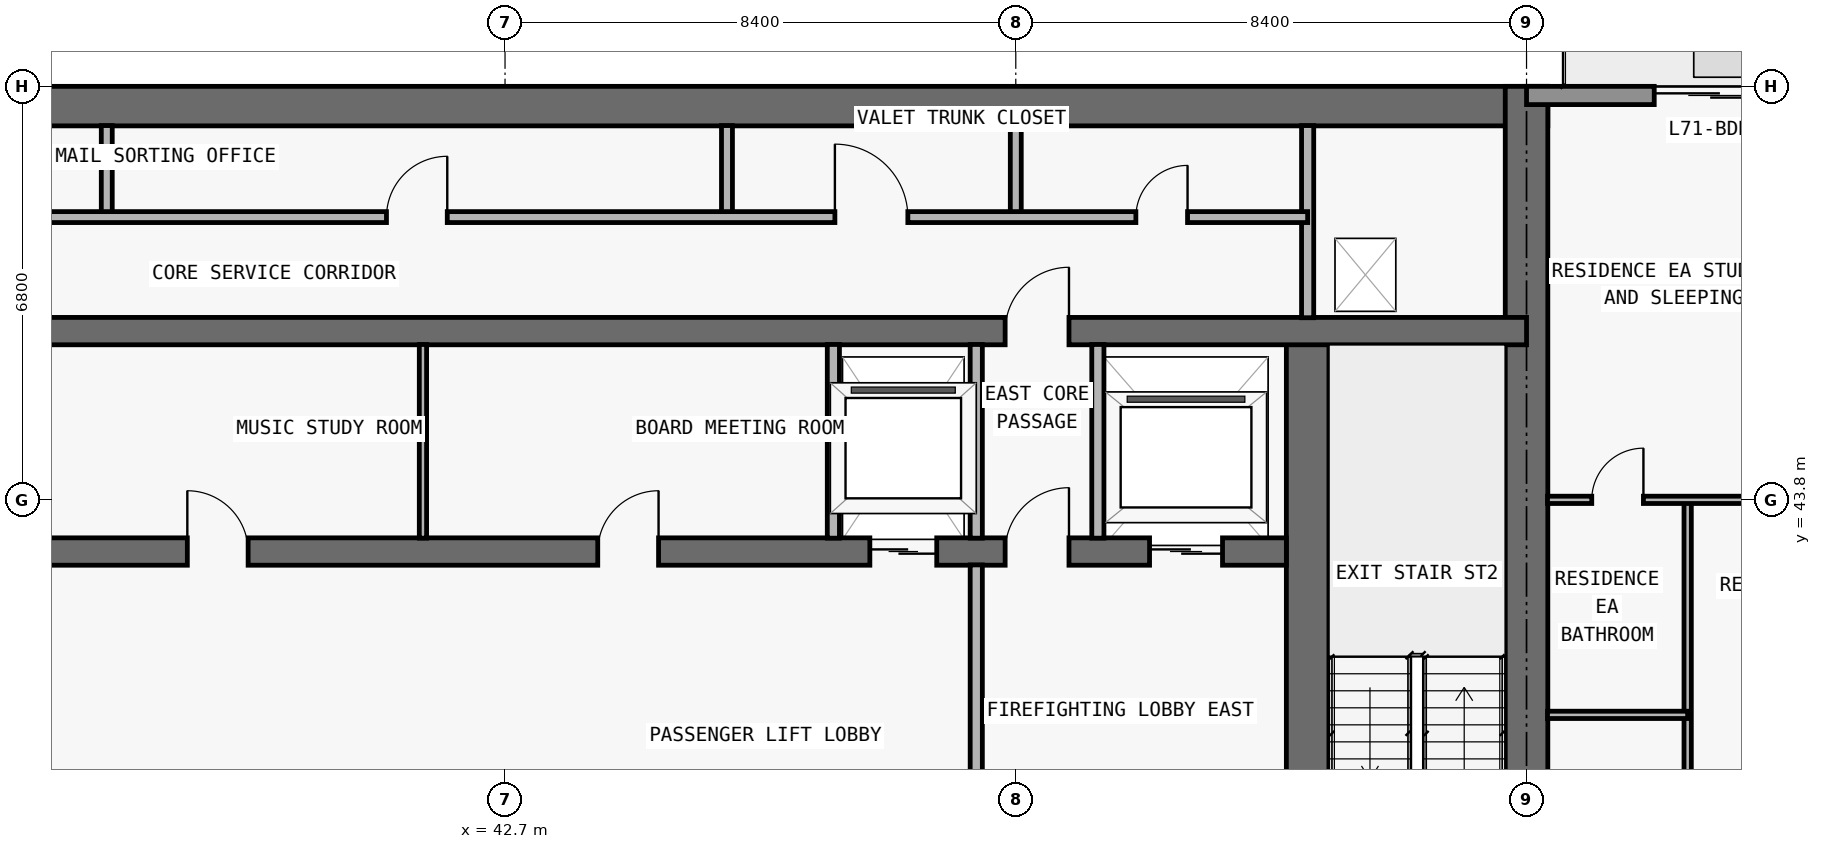
"""IFC4 building model, lengths in metres.
Left out: names, types, materials, properties, quantities, classifications, styles, units other than length and angle.
Written with IfcOpenShell. Run it as: python <this file> out.ifc"""

import sys

from ifc_helpers import new_model, si_unit, direction, frame, frame_2d, origin, place, context, subcontext, project, spatial, rectangle, extrude, element, fill, save


model = new_model("IFC4")
c1 = context("Model", 3, precision=1e-05, world=origin(), true_north=direction((0.0, 1.0)))
c2 = subcontext(c1, "Body", "Model", "MODEL_VIEW")
j1 = project(units=[si_unit("LENGTHUNIT", "METRE"), si_unit("PLANEANGLEUNIT", "RADIAN")], contexts=[c1])
p1 = place(None, origin())
s1 = spatial("IfcSite", under=j1, at=p1, CompositionType="ELEMENT")
p2 = place(p1, origin())
s2 = spatial("IfcBuilding", under=s1, at=p2, CompositionType="ELEMENT")
p3 = place(p2, frame((0.0, 0.0, 252.9)))
s3 = spatial("IfcBuildingStorey", under=s2, at=p3, CompositionType="ELEMENT", Elevation=252.9)
p4 = place(p3, frame((17.95, 50.275, 0.0), z_axis=(0.0, 0.0, 1.0), x_axis=(1.0, 0.0, 0.0)))
e1 = element("IfcWall", 1, at=p4, inside=s3, PredefinedType="SHEAR", context=c2, shape_type="SweptSolid", body=[
    extrude(rectangle(XDim=41.9, YDim=0.65, at=frame_2d((20.95, 0.0))), origin(), (0.0, 0.0, 1.0), 3.05),
])
p5 = place(p3, frame((59.5, 36.65, 0.0), z_axis=(0.0, 0.0, 1.0), x_axis=(0.0, 1.0, 0.0)))
e2 = element("IfcWall", 2, at=p5, inside=s3, PredefinedType="SHEAR", context=c2, shape_type="SweptSolid", body=[
    extrude(rectangle(XDim=13.95, YDim=0.7, at=frame_2d((6.975, 0.0))), origin(), (0.0, 0.0, 1.0), 3.05),
])
p6 = place(p3, frame((55.9, 37.0, 0.0), z_axis=(0.0, 0.0, 1.0), x_axis=(0.0, 1.0, 0.0)))
e3 = element("IfcWall", 3, at=p6, inside=s3, PredefinedType="SHEAR", context=c2, shape_type="SweptSolid", body=[
    extrude(rectangle(XDim=9.575, YDim=0.7, at=frame_2d((4.788, 0.0))), origin(), (0.0, 0.0, 1.0), 3.05),
])
p7 = place(p6, frame((0.55, 0.0, 0.0)))
e4 = element("IfcOpeningElement", 4, at=p7, cuts=e3, PredefinedType="OPENING", context=c2, shape_type="SweptSolid", body=[
    extrude(rectangle(XDim=1.1, YDim=2.15, at=frame_2d((0.55, 1.075))), frame((0.0, 0.36, 0.0), z_axis=(0.0, -1.0, 0.0), x_axis=(1.0, 0.0, 0.0)), (0.0, 0.0, 1.0), 0.72),
])
p8 = place(p3, frame((22.25, 42.95, 0.0), z_axis=(0.0, 0.0, 1.0), x_axis=(1.0, 0.0, 0.0)))
e5 = element("IfcWall", 5, at=p8, inside=s3, PredefinedType="SHEAR", context=c2, shape_type="SweptSolid", body=[
    extrude(rectangle(XDim=33.3, YDim=0.45, at=frame_2d((16.65, 0.0))), origin(), (0.0, 0.0, 1.0), 3.05),
])
p9 = place(p8, frame((1.05, 0.0, 0.0)))
e6 = element("IfcOpeningElement", 6, at=p9, cuts=e5, PredefinedType="OPENING", context=c2, shape_type="SweptSolid", body=[
    extrude(rectangle(XDim=1.2, YDim=2.2, at=frame_2d((0.6, 1.1))), frame((0.0, 0.235, 0.0), z_axis=(0.0, -1.0, 0.0), x_axis=(1.0, 0.0, 0.0)), (0.0, 0.0, 1.0), 0.47),
])
p10 = place(p8, frame((31.05, 0.0, 0.0)))
e7 = element("IfcOpeningElement", 7, at=p10, cuts=e5, PredefinedType="OPENING", context=c2, shape_type="SweptSolid", body=[
    extrude(rectangle(XDim=1.2, YDim=2.2, at=frame_2d((0.6, 1.1))), frame((0.0, 0.235, 0.0), z_axis=(0.0, -1.0, 0.0), x_axis=(1.0, 0.0, 0.0)), (0.0, 0.0, 1.0), 0.47),
])
p11 = place(p8, frame((26.45, 0.0, 0.0)))
e8 = element("IfcOpeningElement", 8, at=p11, cuts=e5, PredefinedType="OPENING", context=c2, shape_type="SweptSolid", body=[
    extrude(rectangle(XDim=1.1, YDim=2.2, at=frame_2d((0.55, 1.1))), frame((0.0, 0.235, 0.0), z_axis=(0.0, -1.0, 0.0), x_axis=(1.0, 0.0, 0.0)), (0.0, 0.0, 1.0), 0.47),
])
p12 = place(p8, frame((5.95, 0.0, 0.0)))
e9 = element("IfcOpeningElement", 9, at=p12, cuts=e5, PredefinedType="OPENING", context=c2, shape_type="SweptSolid", body=[
    extrude(rectangle(XDim=1.1, YDim=2.2, at=frame_2d((0.55, 1.1))), frame((0.0, 0.235, 0.0), z_axis=(0.0, -1.0, 0.0), x_axis=(1.0, 0.0, 0.0)), (0.0, 0.0, 1.0), 0.47),
])
p13 = place(p8, frame((3.625, 0.0, 0.0)))
e10 = element("IfcOpeningElement", 10, at=p13, cuts=e5, PredefinedType="OPENING", context=c2, shape_type="SweptSolid", body=[
    extrude(rectangle(XDim=1.05, YDim=2.15, at=frame_2d((0.525, 1.075))), frame((0.0, 0.235, 0.0), z_axis=(0.0, -1.0, 0.0), x_axis=(1.0, 0.0, 0.0)), (0.0, 0.0, 1.0), 0.47),
])
p14 = place(p8, frame((28.675, 0.0, 0.0)))
e11 = element("IfcOpeningElement", 11, at=p14, cuts=e5, PredefinedType="OPENING", context=c2, shape_type="SweptSolid", body=[
    extrude(rectangle(XDim=1.05, YDim=2.15, at=frame_2d((0.525, 1.075))), frame((0.0, 0.235, 0.0), z_axis=(0.0, -1.0, 0.0), x_axis=(1.0, 0.0, 0.0)), (0.0, 0.0, 1.0), 0.47),
])
p15 = place(p8, frame((15.225, 0.0, 0.0)))
e12 = element("IfcOpeningElement", 12, at=p15, cuts=e5, PredefinedType="OPENING", context=c2, shape_type="SweptSolid", body=[
    extrude(rectangle(XDim=1.0, YDim=2.2, at=frame_2d((0.5, 1.1))), frame((0.0, 0.235, 0.0), z_axis=(0.0, -1.0, 0.0), x_axis=(1.0, 0.0, 0.0)), (0.0, 0.0, 1.0), 0.47),
])
p16 = place(p8, frame((21.975, 0.0, 0.0)))
e13 = element("IfcOpeningElement", 13, at=p16, cuts=e5, PredefinedType="OPENING", context=c2, shape_type="SweptSolid", body=[
    extrude(rectangle(XDim=1.0, YDim=2.2, at=frame_2d((0.5, 1.1))), frame((0.0, 0.235, 0.0), z_axis=(0.0, -1.0, 0.0), x_axis=(1.0, 0.0, 0.0)), (0.0, 0.0, 1.0), 0.47),
])
p17 = place(p3, frame((18.3, 46.575, 0.0), z_axis=(0.0, 0.0, 1.0), x_axis=(1.0, 0.0, 0.0)))
e14 = element("IfcWall", 14, at=p17, inside=s3, PredefinedType="SHEAR", context=c2, shape_type="SweptSolid", body=[
    extrude(rectangle(XDim=41.2, YDim=0.45, at=frame_2d((20.6, 0.0))), origin(), (0.0, 0.0, 1.0), 3.05),
])
p18 = place(p17, frame((7.575, 0.0, 0.0)))
e15 = element("IfcOpeningElement", 15, at=p18, cuts=e14, PredefinedType="OPENING", context=c2, shape_type="SweptSolid", body=[
    extrude(rectangle(XDim=1.05, YDim=2.15, at=frame_2d((0.525, 1.075))), frame((0.0, 0.235, 0.0), z_axis=(0.0, -1.0, 0.0), x_axis=(1.0, 0.0, 0.0)), (0.0, 0.0, 1.0), 0.47),
])
p19 = place(p17, frame((32.625, 0.0, 0.0)))
e16 = element("IfcOpeningElement", 16, at=p19, cuts=e14, PredefinedType="OPENING", context=c2, shape_type="SweptSolid", body=[
    extrude(rectangle(XDim=1.05, YDim=2.15, at=frame_2d((0.525, 1.075))), frame((0.0, 0.235, 0.0), z_axis=(0.0, -1.0, 0.0), x_axis=(1.0, 0.0, 0.0)), (0.0, 0.0, 1.0), 0.47),
])
p20 = place(p3, frame((59.5, 50.45, 0.0), z_axis=(0.0, 0.0, 1.0), x_axis=(1.0, 0.0, 0.0)))
e17 = element("IfcWall", 17, at=p20, inside=s3, PredefinedType="STANDARD", context=c2, shape_type="SweptSolid", body=[
    extrude(rectangle(XDim=6.2, YDim=0.3, at=frame_2d((3.1, 0.0))), origin(), (0.0, 0.0, 1.0), 3.05),
])
p21 = place(p20, frame((2.1, 0.0, 0.0)))
e18 = element("IfcOpeningElement", 18, at=p21, cuts=e17, PredefinedType="OPENING", context=c2, shape_type="SweptSolid", body=[
    extrude(rectangle(XDim=2.0, YDim=2.3, at=frame_2d((1.0, 1.15))), frame((0.0, 0.16, 0.0), z_axis=(0.0, -1.0, 0.0), x_axis=(1.0, 0.0, 0.0)), (0.0, 0.0, 1.0), 0.32),
])
p22 = place(p3, frame((36.15, 48.45, 0.0), z_axis=(0.0, 0.0, 1.0), x_axis=(0.0, 1.0, 0.0)))
e19 = element("IfcWall", 19, at=p22, inside=s3, PredefinedType="PARTITIONING", context=c2, shape_type="SweptSolid", body=[
    extrude(rectangle(XDim=1.505, YDim=0.18, at=frame_2d((0.752, 0.0))), origin(), (0.0, 0.0, 1.0), 3.05),
])
p23 = place(p3, frame((41.35, 43.17, 0.0), z_axis=(0.0, 0.0, 1.0), x_axis=(0.0, 1.0, 0.0)))
e20 = element("IfcWall", 20, at=p23, inside=s3, PredefinedType="PARTITIONING", context=c2, shape_type="SweptSolid", body=[
    extrude(rectangle(XDim=3.185, YDim=0.12, at=frame_2d((1.593, 0.0))), origin(), (0.0, 0.0, 1.0), 3.05),
])
p24 = place(p3, frame((46.35, 48.45, 0.0), z_axis=(0.0, 0.0, 1.0), x_axis=(0.0, 1.0, 0.0)))
e21 = element("IfcWall", 21, at=p24, inside=s3, PredefinedType="PARTITIONING", context=c2, shape_type="SweptSolid", body=[
    extrude(rectangle(XDim=1.505, YDim=0.18, at=frame_2d((0.752, 0.0))), origin(), (0.0, 0.0, 1.0), 3.05),
])
p25 = place(p3, frame((48.1, 43.17, 0.0), z_axis=(0.0, 0.0, 1.0), x_axis=(0.0, 1.0, 0.0)))
e22 = element("IfcWall", 22, at=p25, inside=s3, PredefinedType="PARTITIONING", context=c2, shape_type="SweptSolid", body=[
    extrude(rectangle(XDim=3.185, YDim=0.2, at=frame_2d((1.593, 0.0))), origin(), (0.0, 0.0, 1.0), 3.05),
])
p26 = place(p3, frame((50.45, 37.345, 0.0), z_axis=(0.0, 0.0, 1.0), x_axis=(0.0, 1.0, 0.0)))
e23 = element("IfcWall", 23, at=p26, inside=s3, PredefinedType="PARTITIONING", context=c2, shape_type="SweptSolid", body=[
    extrude(rectangle(XDim=5.385, YDim=0.2, at=frame_2d((2.692, 0.0))), origin(), (0.0, 0.0, 1.0), 3.05),
])
p27 = place(p3, frame((50.45, 43.17, 0.0), z_axis=(0.0, 0.0, 1.0), x_axis=(0.0, 1.0, 0.0)))
e24 = element("IfcWall", 24, at=p27, inside=s3, PredefinedType="PARTITIONING", context=c2, shape_type="SweptSolid", body=[
    extrude(rectangle(XDim=3.185, YDim=0.2, at=frame_2d((1.593, 0.0))), origin(), (0.0, 0.0, 1.0), 3.05),
])
p28 = place(p3, frame((51.1, 48.45, 0.0), z_axis=(0.0, 0.0, 1.0), x_axis=(0.0, 1.0, 0.0)))
e25 = element("IfcWall", 25, at=p28, inside=s3, PredefinedType="PARTITIONING", context=c2, shape_type="SweptSolid", body=[
    extrude(rectangle(XDim=1.505, YDim=0.18, at=frame_2d((0.752, 0.0))), origin(), (0.0, 0.0, 1.0), 3.05),
])
p29 = place(p3, frame((52.45, 43.17, 0.0), z_axis=(0.0, 0.0, 1.0), x_axis=(0.0, 1.0, 0.0)))
e26 = element("IfcWall", 26, at=p29, inside=s3, PredefinedType="PARTITIONING", context=c2, shape_type="SweptSolid", body=[
    extrude(rectangle(XDim=3.185, YDim=0.2, at=frame_2d((1.593, 0.0))), origin(), (0.0, 0.0, 1.0), 3.05),
])
p30 = place(p3, frame((55.9, 46.795, 0.0), z_axis=(0.0, 0.0, 1.0), x_axis=(0.0, 1.0, 0.0)))
e27 = element("IfcWall", 27, at=p30, inside=s3, PredefinedType="PARTITIONING", context=c2, shape_type="SweptSolid", body=[
    extrude(rectangle(XDim=3.16, YDim=0.2, at=frame_2d((1.58, 0.0))), origin(), (0.0, 0.0, 1.0), 3.05),
])
p31 = place(p3, frame((62.15, 37.0, 0.0), z_axis=(0.0, 0.0, 1.0), x_axis=(0.0, 1.0, 0.0)))
e28 = element("IfcWall", 28, at=p31, inside=s3, PredefinedType="PARTITIONING", context=c2, shape_type="SweptSolid", body=[
    extrude(rectangle(XDim=6.8, YDim=0.12, at=frame_2d((3.4, 0.0))), origin(), (0.0, 0.0, 1.0), 3.05),
])
p32 = place(p31, frame((1.207, 0.0, 0.0)))
e29 = element("IfcOpeningElement", 29, at=p32, cuts=e28, PredefinedType="OPENING", context=c2, shape_type="SweptSolid", body=[
    extrude(rectangle(XDim=0.85, YDim=2.1, at=frame_2d((0.425, 1.05))), frame((0.0, 0.07, 0.0), z_axis=(0.0, -1.0, 0.0), x_axis=(1.0, 0.0, 0.0)), (0.0, 0.0, 1.0), 0.14),
])
p33 = place(p3, frame((59.845, 40.264, 0.0), z_axis=(0.0, 0.0, 1.0), x_axis=(1.0, 0.0, 0.0)))
e30 = element("IfcWall", 30, at=p33, inside=s3, PredefinedType="PARTITIONING", context=c2, shape_type="SweptSolid", body=[
    extrude(rectangle(XDim=2.305, YDim=0.12, at=frame_2d((1.152, 0.0))), origin(), (0.0, 0.0, 1.0), 3.05),
])
p34 = place(p3, frame((59.845, 43.8, 0.0), z_axis=(0.0, 0.0, 1.0), x_axis=(1.0, 0.0, 0.0)))
e31 = element("IfcWall", 31, at=p34, inside=s3, PredefinedType="PARTITIONING", context=c2, shape_type="SweptSolid", body=[
    extrude(rectangle(XDim=9.56, YDim=0.12, at=frame_2d((4.78, 0.0))), origin(), (0.0, 0.0, 1.0), 2.418),
])
p35 = place(p34, frame((3.63, 0.0, 0.0)))
e32 = element("IfcOpeningElement", 32, at=p35, cuts=e31, PredefinedType="OPENING", context=c2, shape_type="SweptSolid", body=[
    extrude(rectangle(XDim=0.9, YDim=2.15, at=frame_2d((0.45, 1.075))), frame((0.0, 0.07, 0.0), z_axis=(0.0, -1.0, 0.0), x_axis=(1.0, 0.0, 0.0)), (0.0, 0.0, 1.0), 0.14),
])
p36 = place(p34, frame((0.728, 0.0, 0.0)))
e33 = element("IfcOpeningElement", 33, at=p36, cuts=e31, PredefinedType="OPENING", context=c2, shape_type="SweptSolid", body=[
    extrude(rectangle(XDim=0.85, YDim=2.1, at=frame_2d((0.425, 1.05))), frame((0.0, 0.07, 0.0), z_axis=(0.0, -1.0, 0.0), x_axis=(1.0, 0.0, 0.0)), (0.0, 0.0, 1.0), 0.14),
])
p37 = place(p3, frame((26.7, 48.45, 0.0), z_axis=(0.0, 0.0, 1.0), x_axis=(1.0, 0.0, 0.0)))
e34 = element("IfcWall", 34, at=p37, inside=s3, PredefinedType="PARTITIONING", context=c2, shape_type="SweptSolid", body=[
    extrude(rectangle(XDim=29.2, YDim=0.18, at=frame_2d((14.6, 0.0))), origin(), (0.0, 0.0, 1.0), 3.05),
])
p38 = place(p37, frame((1.75, 0.0, 0.0)))
e35 = element("IfcOpeningElement", 35, at=p38, cuts=e34, PredefinedType="OPENING", context=c2, shape_type="SweptSolid", body=[
    extrude(rectangle(XDim=1.2, YDim=2.2, at=frame_2d((0.6, 1.1))), frame((0.0, 0.1, 0.0), z_axis=(0.0, -1.0, 0.0), x_axis=(1.0, 0.0, 0.0)), (0.0, 0.0, 1.0), 0.2),
])
p39 = place(p37, frame((6.475, 0.0, 0.0)))
e36 = element("IfcOpeningElement", 36, at=p39, cuts=e34, PredefinedType="OPENING", context=c2, shape_type="SweptSolid", body=[
    extrude(rectangle(XDim=1.2, YDim=2.2, at=frame_2d((0.6, 1.1))), frame((0.0, 0.1, 0.0), z_axis=(0.0, -1.0, 0.0), x_axis=(1.0, 0.0, 0.0)), (0.0, 0.0, 1.0), 0.2),
])
p40 = place(p37, frame((14.05, 0.0, 0.0)))
e37 = element("IfcOpeningElement", 37, at=p40, cuts=e34, PredefinedType="OPENING", context=c2, shape_type="SweptSolid", body=[
    extrude(rectangle(XDim=1.0, YDim=2.2, at=frame_2d((0.5, 1.1))), frame((0.0, 0.1, 0.0), z_axis=(0.0, -1.0, 0.0), x_axis=(1.0, 0.0, 0.0)), (0.0, 0.0, 1.0), 0.2),
])
p41 = place(p37, frame((21.425, 0.0, 0.0)))
e38 = element("IfcOpeningElement", 38, at=p41, cuts=e34, PredefinedType="OPENING", context=c2, shape_type="SweptSolid", body=[
    extrude(rectangle(XDim=1.2, YDim=2.2, at=frame_2d((0.6, 1.1))), frame((0.0, 0.1, 0.0), z_axis=(0.0, -1.0, 0.0), x_axis=(1.0, 0.0, 0.0)), (0.0, 0.0, 1.0), 0.2),
])
p42 = place(p37, frame((26.375, 0.0, 0.0)))
e39 = element("IfcOpeningElement", 39, at=p42, cuts=e34, PredefinedType="OPENING", context=c2, shape_type="SweptSolid", body=[
    extrude(rectangle(XDim=0.85, YDim=2.1, at=frame_2d((0.425, 1.05))), frame((0.0, 0.1, 0.0), z_axis=(0.0, -1.0, 0.0), x_axis=(1.0, 0.0, 0.0)), (0.0, 0.0, 1.0), 0.2),
])
p43 = place(p21, origin())
e40 = element("IfcDoor", 40, at=p43, inside=s3, OperationType="DOUBLE_DOOR_SLIDING", PredefinedType="DOOR", context=c2, shape_type="SweptSolid", body=[
    extrude(rectangle(XDim=2.0, YDim=2.3, at=frame_2d((1.0, 1.15))), frame((0.0, 0.025, 0.0), z_axis=(0.0, -1.0, 0.0), x_axis=(1.0, 0.0, 0.0)), (0.0, 0.0, 1.0), 0.05),
])
fill(e18, e40)
p44 = place(p10, origin())
e41 = element("IfcDoor", 41, at=p44, inside=s3, OperationType="DOUBLE_DOOR_SLIDING", PredefinedType="DOOR", context=c2, shape_type="SweptSolid", body=[
    extrude(rectangle(XDim=1.2, YDim=2.2, at=frame_2d((0.6, 1.1))), frame((0.0, 0.025, 0.0), z_axis=(0.0, -1.0, 0.0), x_axis=(1.0, 0.0, 0.0)), (0.0, 0.0, 1.0), 0.05),
])
fill(e7, e41)
p45 = place(p11, origin())
e42 = element("IfcDoor", 42, at=p45, inside=s3, OperationType="DOUBLE_DOOR_SLIDING", PredefinedType="DOOR", context=c2, shape_type="SweptSolid", body=[
    extrude(rectangle(XDim=1.1, YDim=2.2, at=frame_2d((0.55, 1.1))), frame((0.0, 0.025, 0.0), z_axis=(0.0, -1.0, 0.0), x_axis=(1.0, 0.0, 0.0)), (0.0, 0.0, 1.0), 0.05),
])
fill(e8, e42)
p46 = place(p14, origin())
e43 = element("IfcDoor", 43, at=p46, inside=s3, OperationType="SINGLE_SWING_RIGHT", PredefinedType="DOOR", context=c2, shape_type="SweptSolid", body=[
    extrude(rectangle(XDim=1.05, YDim=2.15, at=frame_2d((0.525, 1.075))), frame((0.0, 0.025, 0.0), z_axis=(0.0, -1.0, 0.0), x_axis=(1.0, 0.0, 0.0)), (0.0, 0.0, 1.0), 0.05),
])
fill(e11, e43)
p47 = place(p15, origin())
e44 = element("IfcDoor", 44, at=p47, inside=s3, OperationType="SINGLE_SWING_LEFT", PredefinedType="DOOR", context=c2, shape_type="SweptSolid", body=[
    extrude(rectangle(XDim=1.0, YDim=2.2, at=frame_2d((0.5, 1.1))), frame((0.0, 0.025, 0.0), z_axis=(0.0, -1.0, 0.0), x_axis=(1.0, 0.0, 0.0)), (0.0, 0.0, 1.0), 0.05),
])
fill(e12, e44)
p48 = place(p16, origin())
e45 = element("IfcDoor", 45, at=p48, inside=s3, OperationType="SINGLE_SWING_RIGHT", PredefinedType="DOOR", context=c2, shape_type="SweptSolid", body=[
    extrude(rectangle(XDim=1.0, YDim=2.2, at=frame_2d((0.5, 1.1))), frame((0.0, 0.025, 0.0), z_axis=(0.0, -1.0, 0.0), x_axis=(1.0, 0.0, 0.0)), (0.0, 0.0, 1.0), 0.05),
])
fill(e13, e45)
p49 = place(p19, origin())
e46 = element("IfcDoor", 46, at=p49, inside=s3, OperationType="SINGLE_SWING_RIGHT", PredefinedType="DOOR", context=c2, shape_type="SweptSolid", body=[
    extrude(rectangle(XDim=1.05, YDim=2.15, at=frame_2d((0.525, 1.075))), frame((0.0, 0.025, 0.0), z_axis=(0.0, -1.0, 0.0), x_axis=(1.0, 0.0, 0.0)), (0.0, 0.0, 1.0), 0.05),
])
fill(e16, e46)
p50 = place(p40, origin())
e47 = element("IfcDoor", 47, at=p50, inside=s3, OperationType="SINGLE_SWING_RIGHT", PredefinedType="DOOR", context=c2, shape_type="SweptSolid", body=[
    extrude(rectangle(XDim=1.0, YDim=2.2, at=frame_2d((0.5, 1.1))), frame((0.0, 0.025, 0.0), z_axis=(0.0, -1.0, 0.0), x_axis=(1.0, 0.0, 0.0)), (0.0, 0.0, 1.0), 0.05),
])
fill(e37, e47)
p51 = place(p41, origin())
e48 = element("IfcDoor", 48, at=p51, inside=s3, OperationType="SINGLE_SWING_LEFT", PredefinedType="DOOR", context=c2, shape_type="SweptSolid", body=[
    extrude(rectangle(XDim=1.2, YDim=2.2, at=frame_2d((0.6, 1.1))), frame((0.0, 0.025, 0.0), z_axis=(0.0, -1.0, 0.0), x_axis=(1.0, 0.0, 0.0)), (0.0, 0.0, 1.0), 0.05),
])
fill(e38, e48)
p52 = place(p42, origin())
e49 = element("IfcDoor", 49, at=p52, inside=s3, OperationType="SINGLE_SWING_RIGHT", PredefinedType="DOOR", context=c2, shape_type="SweptSolid", body=[
    extrude(rectangle(XDim=0.85, YDim=2.1, at=frame_2d((0.425, 1.05))), frame((0.0, 0.025, 0.0), z_axis=(0.0, -1.0, 0.0), x_axis=(1.0, 0.0, 0.0)), (0.0, 0.0, 1.0), 0.05),
])
fill(e39, e49)
p53 = place(p36, origin())
e50 = element("IfcDoor", 50, at=p53, inside=s3, OperationType="SINGLE_SWING_RIGHT", PredefinedType="DOOR", context=c2, shape_type="SweptSolid", body=[
    extrude(rectangle(XDim=0.85, YDim=2.1, at=frame_2d((0.425, 1.05))), frame((0.0, 0.025, 0.0), z_axis=(0.0, -1.0, 0.0), x_axis=(1.0, 0.0, 0.0)), (0.0, 0.0, 1.0), 0.05),
])
fill(e33, e50)
save(model, sys.argv[1])
